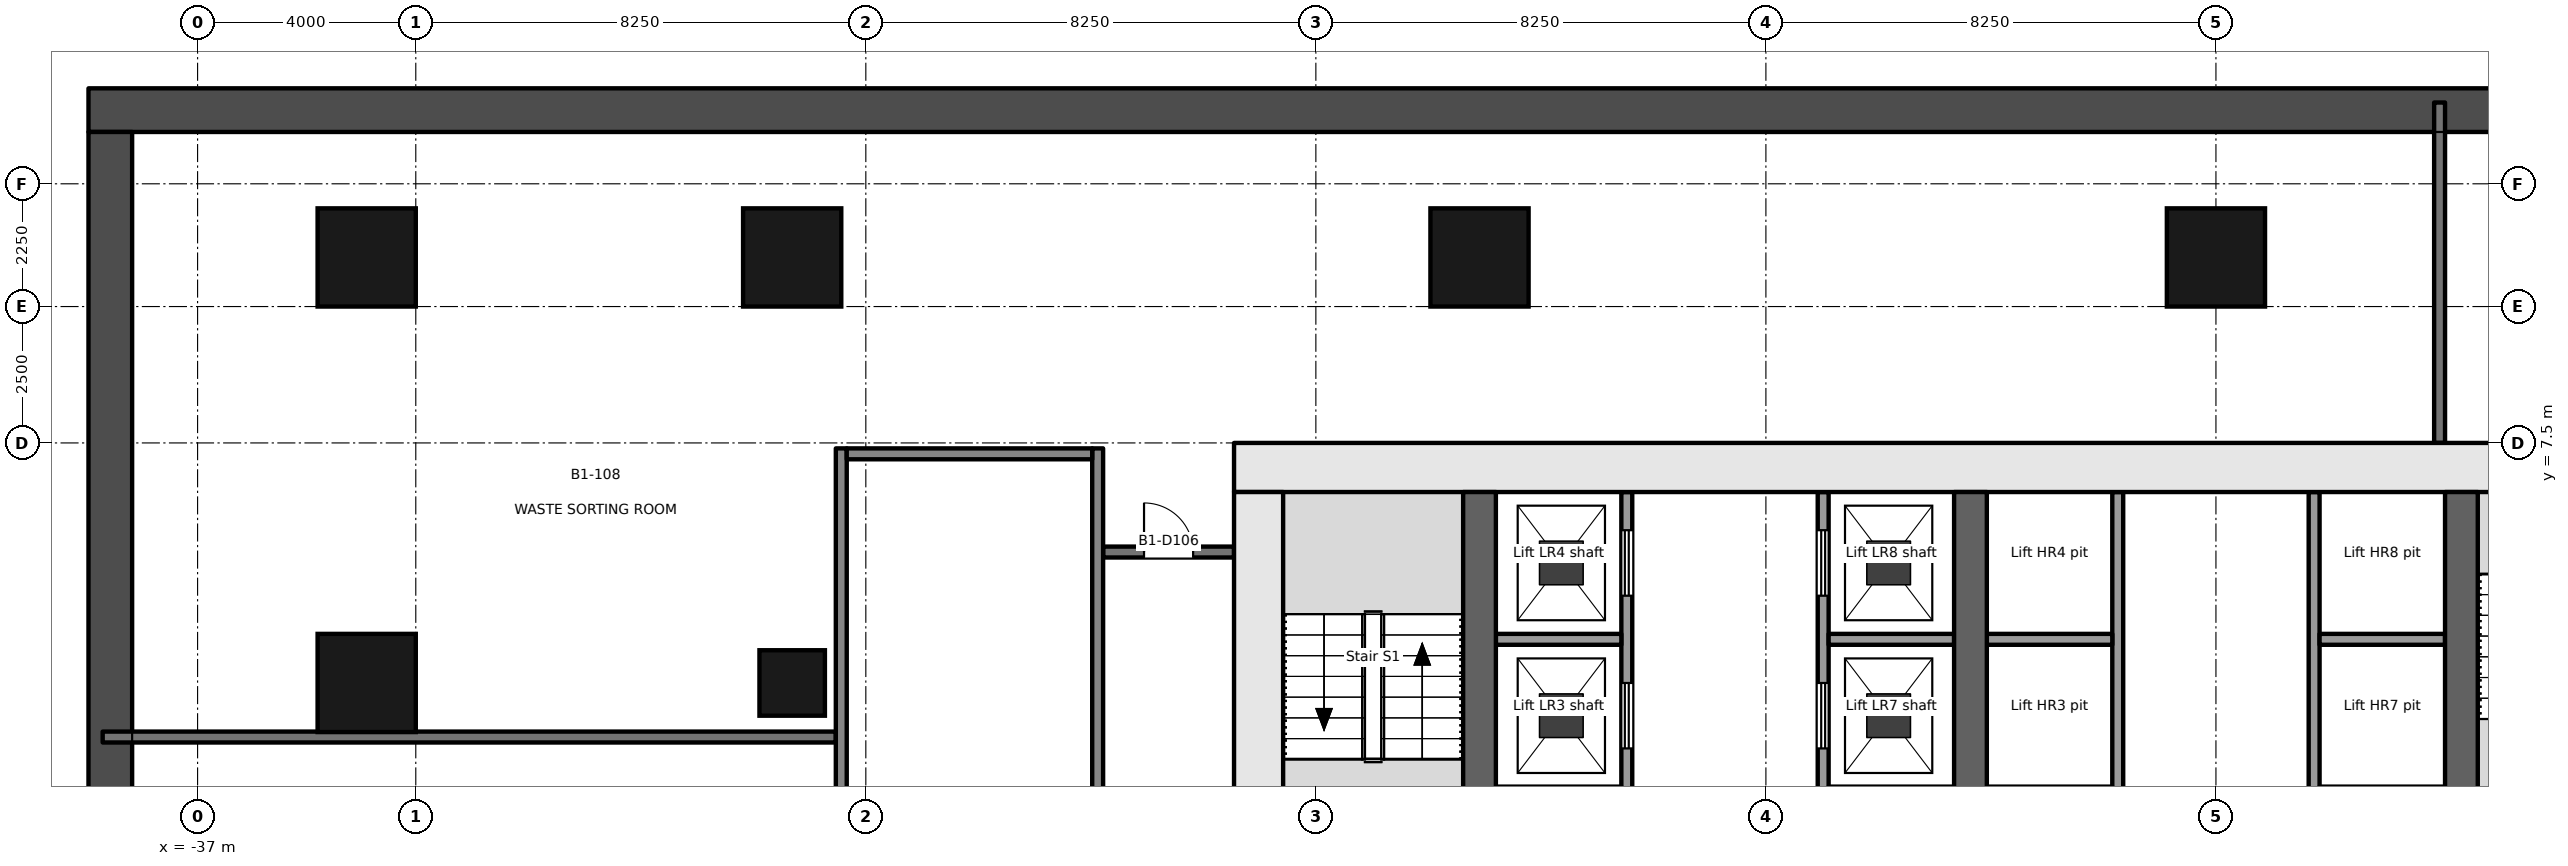
"""IFC4 building model, lengths in metres.
Left out: names, types, materials, properties, quantities, classifications, styles, units other than length and angle.
Written with IfcOpenShell. Run it as: python <this file> out.ifc"""

import sys

from ifc_helpers import new_model, si_unit, direction, frame, frame_2d, origin, origin_2d, place, context, subcontext, project, spatial, rectangle, extrude, element, fill, save


model = new_model("IFC4")
c1 = context("Model", 3, precision=1e-05, world=origin(), true_north=direction((0.0, 1.0)))
c2 = subcontext(c1, "Body", "Model", "MODEL_VIEW")
j1 = project(units=[si_unit("LENGTHUNIT", "METRE"), si_unit("PLANEANGLEUNIT", "RADIAN")], contexts=[c1])
p1 = place(None, origin())
s1 = spatial("IfcSite", under=j1, at=p1, CompositionType="ELEMENT")
p2 = place(p1, origin())
s2 = spatial("IfcBuilding", under=s1, at=p2, CompositionType="ELEMENT")
p3 = place(p2, frame((0.0, 0.0, -5.5)))
s3 = spatial("IfcBuildingStorey", under=s2, at=p3, CompositionType="ELEMENT", Elevation=-5.5)
p4 = place(p3, frame((-39.0, 13.6, -0.2), z_axis=(0.0, 0.0, 1.0), x_axis=(1.0, 0.0, 0.0)))
e1 = element("IfcWall", 1, at=p4, inside=s3, PredefinedType="SOLIDWALL", context=c2, shape_type="SweptSolid", body=[
    extrude(rectangle(XDim=78.0, YDim=0.8, at=frame_2d((39.0, 0.0))), origin(), (0.0, 0.0, 1.0), 5.5),
])
p5 = place(p3, frame((-38.6, -38.7, -0.2), z_axis=(0.0, 0.0, 1.0), x_axis=(0.0, 1.0, 0.0)))
e2 = element("IfcWall", 2, at=p5, inside=s3, PredefinedType="SOLIDWALL", context=c2, shape_type="SweptSolid", body=[
    extrude(rectangle(XDim=51.9, YDim=0.8, at=frame_2d((25.95, 0.0))), origin(), (0.0, 0.0, 1.0), 5.5),
])
for number, where, z_axis, x_axis in (
    (3, (-33.9, 10.9, -0.2), (0.0, 0.0, 1.0), (1.0, 0.0, 0.0)),
    (4, (-33.9, 3.1, -0.2), (0.0, 0.0, 1.0), (0.0, 1.0, 0.0)),
    (5, (-26.1, 10.9, -0.2), (0.0, 0.0, 1.0), (1.0, 0.0, 0.0)),
    (6, (-13.5, 10.9, -0.2), (0.0, 0.0, 1.0), (1.0, 0.0, 0.0)),
    (7, (0.0, 10.9, -0.2), (0.0, 0.0, 1.0), (1.0, 0.0, 0.0)),
):
    element("IfcColumn", number, at=place(p3, frame(where, z_axis=z_axis, x_axis=x_axis)), inside=s3, PredefinedType="COLUMN", context=c2, shape_type="SweptSolid", body=[
        extrude(rectangle(XDim=1.8, YDim=1.8, at=origin_2d()), origin(), (0.0, 0.0, 1.0), 5.5),
    ])
p6 = place(p3, frame((-26.1, 3.1, -0.2), z_axis=(0.0, 0.0, 1.0), x_axis=(1.0, 0.0, 0.0)))
e8 = element("IfcColumn", 8, at=p6, inside=s3, PredefinedType="COLUMN", context=c2, shape_type="SweptSolid", body=[
    extrude(rectangle(XDim=1.2, YDim=1.2, at=origin_2d()), origin(), (0.0, 0.0, 1.0), 5.5),
])
p7 = place(p3, frame((-18.0, 7.05, -0.2), z_axis=(0.0, 0.0, 1.0), x_axis=(1.0, 0.0, 0.0)))
e9 = element("IfcWall", 9, at=p7, inside=s3, PredefinedType="SHEAR", context=c2, shape_type="SweptSolid", body=[
    extrude(rectangle(XDim=36.0, YDim=0.9, at=frame_2d((18.0, 0.0))), origin(), (0.0, 0.0, 1.0), 5.5),
])
p8 = place(p3, frame((-17.55, -6.6, -0.2), z_axis=(0.0, 0.0, 1.0), x_axis=(0.0, 1.0, 0.0)))
e10 = element("IfcWall", 10, at=p8, inside=s3, PredefinedType="SHEAR", context=c2, shape_type="SweptSolid", body=[
    extrude(rectangle(XDim=13.2, YDim=0.9, at=frame_2d((6.6, 0.0))), origin(), (0.0, 0.0, 1.0), 5.5),
])
p9 = place(p8, frame((4.55, 0.0, 0.2)))
e11 = element("IfcOpeningElement", 11, at=p9, cuts=e10, PredefinedType="OPENING", context=c2, shape_type="SweptSolid", body=[
    extrude(rectangle(XDim=1.2, YDim=2.1, at=frame_2d((0.6, 1.05))), frame((0.0, 0.46, 0.0), z_axis=(0.0, -1.0, 0.0), x_axis=(1.0, 0.0, 0.0)), (0.0, 0.0, 1.0), 0.921),
])
for number, where, z_axis, x_axis in (
    (12, (-13.5, -6.6, -0.2), (0.0, 0.0, 1.0), (0.0, 1.0, 0.0)),
    (13, (-4.5, -6.6, -0.2), (0.0, 0.0, 1.0), (0.0, 1.0, 0.0)),
    (14, (4.5, -6.6, -0.2), (0.0, 0.0, 1.0), (0.0, 1.0, 0.0)),
):
    element("IfcWall", number, at=place(p3, frame(where, z_axis=z_axis, x_axis=x_axis)), inside=s3, PredefinedType="SHEAR", context=c2, shape_type="SweptSolid", body=[
        extrude(rectangle(XDim=13.2, YDim=0.6, at=frame_2d((6.6, 0.0))), origin(), (0.0, 0.0, 1.0), 5.5),
    ])
p10 = place(p3, frame((-10.8, -6.6, 0.0), z_axis=(0.0, 0.0, 1.0), x_axis=(0.0, 1.0, 0.0)))
e15 = element("IfcWall", 15, at=p10, inside=s3, PredefinedType="PARTITIONING", context=c2, shape_type="SweptSolid", body=[
    extrude(rectangle(XDim=13.2, YDim=0.2, at=frame_2d((6.6, 0.0))), origin(), (0.0, 0.0, 1.0), 5.3),
])
p11 = place(p10, frame((0.55, 0.0, 0.0)))
e16 = element("IfcOpeningElement", 16, at=p11, cuts=e15, PredefinedType="OPENING", context=c2, shape_type="SweptSolid", body=[
    extrude(rectangle(XDim=0.9, YDim=2.1, at=frame_2d((0.45, 1.05))), frame((0.0, 0.111, 0.0), z_axis=(0.0, -1.0, 0.0), x_axis=(1.0, 0.0, 0.0)), (0.0, 0.0, 1.0), 0.221),
])
p12 = place(p10, frame((2.9, 0.0, 0.0)))
e17 = element("IfcOpeningElement", 17, at=p12, cuts=e15, PredefinedType="OPENING", context=c2, shape_type="SweptSolid", body=[
    extrude(rectangle(XDim=1.2, YDim=2.1, at=frame_2d((0.6, 1.05))), frame((0.0, 0.111, 0.0), z_axis=(0.0, -1.0, 0.0), x_axis=(1.0, 0.0, 0.0)), (0.0, 0.0, 1.0), 0.221),
])
p13 = place(p10, frame((5.7, 0.0, 0.0)))
e18 = element("IfcOpeningElement", 18, at=p13, cuts=e15, PredefinedType="OPENING", context=c2, shape_type="SweptSolid", body=[
    extrude(rectangle(XDim=1.2, YDim=2.1, at=frame_2d((0.6, 1.05))), frame((0.0, 0.111, 0.0), z_axis=(0.0, -1.0, 0.0), x_axis=(1.0, 0.0, 0.0)), (0.0, 0.0, 1.0), 0.221),
])
p14 = place(p10, frame((8.5, 0.0, 0.0)))
e19 = element("IfcOpeningElement", 19, at=p14, cuts=e15, PredefinedType="OPENING", context=c2, shape_type="SweptSolid", body=[
    extrude(rectangle(XDim=1.2, YDim=2.1, at=frame_2d((0.6, 1.05))), frame((0.0, 0.111, 0.0), z_axis=(0.0, -1.0, 0.0), x_axis=(1.0, 0.0, 0.0)), (0.0, 0.0, 1.0), 0.221),
])
p15 = place(p10, frame((11.3, 0.0, 0.0)))
e20 = element("IfcOpeningElement", 20, at=p15, cuts=e15, PredefinedType="OPENING", context=c2, shape_type="SweptSolid", body=[
    extrude(rectangle(XDim=1.2, YDim=2.1, at=frame_2d((0.6, 1.05))), frame((0.0, 0.111, 0.0), z_axis=(0.0, -1.0, 0.0), x_axis=(1.0, 0.0, 0.0)), (0.0, 0.0, 1.0), 0.221),
])
p16 = place(p3, frame((-7.2, -6.6, 0.0), z_axis=(0.0, 0.0, 1.0), x_axis=(0.0, 1.0, 0.0)))
e21 = element("IfcWall", 21, at=p16, inside=s3, PredefinedType="PARTITIONING", context=c2, shape_type="SweptSolid", body=[
    extrude(rectangle(XDim=13.2, YDim=0.2, at=frame_2d((6.6, 0.0))), origin(), (0.0, 0.0, 1.0), 5.3),
])
p17 = place(p16, frame((0.55, 0.0, 0.0)))
e22 = element("IfcOpeningElement", 22, at=p17, cuts=e21, PredefinedType="OPENING", context=c2, shape_type="SweptSolid", body=[
    extrude(rectangle(XDim=0.9, YDim=2.1, at=frame_2d((0.45, 1.05))), frame((0.0, 0.111, 0.0), z_axis=(0.0, -1.0, 0.0), x_axis=(1.0, 0.0, 0.0)), (0.0, 0.0, 1.0), 0.221),
])
p18 = place(p16, frame((2.9, 0.0, 0.0)))
e23 = element("IfcOpeningElement", 23, at=p18, cuts=e21, PredefinedType="OPENING", context=c2, shape_type="SweptSolid", body=[
    extrude(rectangle(XDim=1.2, YDim=2.1, at=frame_2d((0.6, 1.05))), frame((0.0, 0.111, 0.0), z_axis=(0.0, -1.0, 0.0), x_axis=(1.0, 0.0, 0.0)), (0.0, 0.0, 1.0), 0.221),
])
p19 = place(p16, frame((5.7, 0.0, 0.0)))
e24 = element("IfcOpeningElement", 24, at=p19, cuts=e21, PredefinedType="OPENING", context=c2, shape_type="SweptSolid", body=[
    extrude(rectangle(XDim=1.2, YDim=2.1, at=frame_2d((0.6, 1.05))), frame((0.0, 0.111, 0.0), z_axis=(0.0, -1.0, 0.0), x_axis=(1.0, 0.0, 0.0)), (0.0, 0.0, 1.0), 0.221),
])
p20 = place(p16, frame((8.5, 0.0, 0.0)))
e25 = element("IfcOpeningElement", 25, at=p20, cuts=e21, PredefinedType="OPENING", context=c2, shape_type="SweptSolid", body=[
    extrude(rectangle(XDim=1.2, YDim=2.1, at=frame_2d((0.6, 1.05))), frame((0.0, 0.111, 0.0), z_axis=(0.0, -1.0, 0.0), x_axis=(1.0, 0.0, 0.0)), (0.0, 0.0, 1.0), 0.221),
])
p21 = place(p16, frame((11.3, 0.0, 0.0)))
e26 = element("IfcOpeningElement", 26, at=p21, cuts=e21, PredefinedType="OPENING", context=c2, shape_type="SweptSolid", body=[
    extrude(rectangle(XDim=1.2, YDim=2.1, at=frame_2d((0.6, 1.05))), frame((0.0, 0.111, 0.0), z_axis=(0.0, -1.0, 0.0), x_axis=(1.0, 0.0, 0.0)), (0.0, 0.0, 1.0), 0.221),
])
for number, where, z_axis, x_axis in (
    (27, (-13.2, 3.9, 0.0), (0.0, 0.0, 1.0), (1.0, 0.0, 0.0)),
    (28, (-7.1, 3.9, 0.0), (0.0, 0.0, 1.0), (1.0, 0.0, 0.0)),
):
    element("IfcWall", number, at=place(p3, frame(where, z_axis=z_axis, x_axis=x_axis)), inside=s3, PredefinedType="PARTITIONING", context=c2, shape_type="SweptSolid", body=[
        extrude(rectangle(XDim=2.3, YDim=0.2, at=frame_2d((1.15, 0.0))), origin(), (0.0, 0.0, 1.0), 5.3),
    ])
p22 = place(p3, frame((-1.8, -6.6, 0.0), z_axis=(0.0, 0.0, 1.0), x_axis=(0.0, 1.0, 0.0)))
e29 = element("IfcWall", 29, at=p22, inside=s3, PredefinedType="PARTITIONING", context=c2, shape_type="SweptSolid", body=[
    extrude(rectangle(XDim=13.2, YDim=0.2, at=frame_2d((6.6, 0.0))), origin(), (0.0, 0.0, 1.0), 5.3),
])
p23 = place(p22, frame((0.55, 0.0, 0.0)))
e30 = element("IfcOpeningElement", 30, at=p23, cuts=e29, PredefinedType="OPENING", context=c2, shape_type="SweptSolid", body=[
    extrude(rectangle(XDim=0.9, YDim=2.1, at=frame_2d((0.45, 1.05))), frame((0.0, 0.111, 0.0), z_axis=(0.0, -1.0, 0.0), x_axis=(1.0, 0.0, 0.0)), (0.0, 0.0, 1.0), 0.221),
])
p24 = place(p3, frame((1.8, -6.6, 0.0), z_axis=(0.0, 0.0, 1.0), x_axis=(0.0, 1.0, 0.0)))
e31 = element("IfcWall", 31, at=p24, inside=s3, PredefinedType="PARTITIONING", context=c2, shape_type="SweptSolid", body=[
    extrude(rectangle(XDim=13.2, YDim=0.2, at=frame_2d((6.6, 0.0))), origin(), (0.0, 0.0, 1.0), 5.3),
])
p25 = place(p24, frame((0.55, 0.0, 0.0)))
e32 = element("IfcOpeningElement", 32, at=p25, cuts=e31, PredefinedType="OPENING", context=c2, shape_type="SweptSolid", body=[
    extrude(rectangle(XDim=0.9, YDim=2.1, at=frame_2d((0.45, 1.05))), frame((0.0, 0.111, 0.0), z_axis=(0.0, -1.0, 0.0), x_axis=(1.0, 0.0, 0.0)), (0.0, 0.0, 1.0), 0.221),
])
for number, where, z_axis, x_axis in (
    (33, (-4.2, 3.9, 0.0), (0.0, 0.0, 1.0), (1.0, 0.0, 0.0)),
    (34, (1.9, 3.9, 0.0), (0.0, 0.0, 1.0), (1.0, 0.0, 0.0)),
):
    element("IfcWall", number, at=place(p3, frame(where, z_axis=z_axis, x_axis=x_axis)), inside=s3, PredefinedType="PARTITIONING", context=c2, shape_type="SweptSolid", body=[
        extrude(rectangle(XDim=2.3, YDim=0.2, at=frame_2d((1.15, 0.0))), origin(), (0.0, 0.0, 1.0), 5.3),
    ])
for number, where, z_axis, x_axis in (
    (35, (-20.5, 7.4, -0.2), (0.0, 0.0, 1.0), (0.0, -1.0, 0.0)),
    (36, (-25.2, 0.0, -0.2), (0.0, 0.0, 1.0), (0.0, 1.0, 0.0)),
):
    element("IfcWall", number, at=place(p3, frame(where, z_axis=z_axis, x_axis=x_axis)), inside=s3, PredefinedType="SHEAR", context=c2, shape_type="SweptSolid", body=[
        extrude(rectangle(XDim=7.4, YDim=0.2, at=frame_2d((3.7, 0.0))), origin(), (0.0, 0.0, 1.0), 5.5),
    ])
p26 = place(p3, frame((-25.1, 7.3, -0.2), z_axis=(0.0, 0.0, 1.0), x_axis=(1.0, 0.0, 0.0)))
e37 = element("IfcWall", 37, at=p26, inside=s3, PredefinedType="SHEAR", context=c2, shape_type="SweptSolid", body=[
    extrude(rectangle(XDim=4.5, YDim=0.2, at=frame_2d((2.25, 0.0))), origin(), (0.0, 0.0, 1.0), 5.5),
])
p27 = place(p3, frame((-20.4, 5.5, 0.0), z_axis=(0.0, 0.0, 1.0), x_axis=(1.0, 0.0, 0.0)))
e38 = element("IfcWall", 38, at=p27, inside=s3, PredefinedType="PARTITIONING", context=c2, shape_type="SweptSolid", body=[
    extrude(rectangle(XDim=2.4, YDim=0.2, at=frame_2d((1.2, 0.0))), origin(), (0.0, 0.0, 1.0), 5.3),
])
p28 = place(p27, frame((0.75, 0.0, 0.0)))
e39 = element("IfcOpeningElement", 39, at=p28, cuts=e38, PredefinedType="OPENING", context=c2, shape_type="SweptSolid", body=[
    extrude(rectangle(XDim=0.9, YDim=2.1, at=frame_2d((0.45, 1.05))), frame((0.0, 0.111, 0.0), z_axis=(0.0, -1.0, 0.0), x_axis=(1.0, 0.0, 0.0)), (0.0, 0.0, 1.0), 0.221),
])
p29 = place(p3, frame((-38.74, 2.109, 0.0), z_axis=(0.0, 0.0, 1.0), x_axis=(1.0, 0.0, 0.0)))
e40 = element("IfcWall", 40, at=p29, inside=s3, PredefinedType="PARTITIONING", context=c2, shape_type="SweptSolid", body=[
    extrude(rectangle(XDim=13.44, YDim=0.2, at=frame_2d((6.72, 0.0))), origin(), (0.0, 0.0, 1.0), 4.1),
])
p30 = place(p3, frame((4.1, 13.74, 0.0), z_axis=(0.0, 0.0, 1.0), x_axis=(0.0, -1.0, 0.0)))
e41 = element("IfcWall", 41, at=p30, inside=s3, PredefinedType="PARTITIONING", context=c2, shape_type="SweptSolid", body=[
    extrude(rectangle(XDim=6.24, YDim=0.2, at=frame_2d((3.12, 0.0))), origin(), (0.0, 0.0, 1.0), 4.3),
])
p31 = place(p14, origin())
e42 = element("IfcDoor", 42, at=p31, inside=s3, OperationType="DOUBLE_DOOR_SLIDING", PredefinedType="DOOR", context=c2, shape_type="SweptSolid", body=[
    extrude(rectangle(XDim=1.2, YDim=2.1, at=frame_2d((0.6, 1.05))), frame((0.0, 0.025, 0.0), z_axis=(0.0, -1.0, 0.0), x_axis=(1.0, 0.0, 0.0)), (0.0, 0.0, 1.0), 0.05),
])
fill(e19, e42)
p32 = place(p15, origin())
e43 = element("IfcDoor", 43, at=p32, inside=s3, OperationType="DOUBLE_DOOR_SLIDING", PredefinedType="DOOR", context=c2, shape_type="SweptSolid", body=[
    extrude(rectangle(XDim=1.2, YDim=2.1, at=frame_2d((0.6, 1.05))), frame((0.0, 0.025, 0.0), z_axis=(0.0, -1.0, 0.0), x_axis=(1.0, 0.0, 0.0)), (0.0, 0.0, 1.0), 0.05),
])
fill(e20, e43)
p33 = place(p20, origin())
e44 = element("IfcDoor", 44, at=p33, inside=s3, OperationType="DOUBLE_DOOR_SLIDING", PredefinedType="DOOR", context=c2, shape_type="SweptSolid", body=[
    extrude(rectangle(XDim=1.2, YDim=2.1, at=frame_2d((0.6, 1.05))), frame((0.0, 0.025, 0.0), z_axis=(0.0, -1.0, 0.0), x_axis=(1.0, 0.0, 0.0)), (0.0, 0.0, 1.0), 0.05),
])
fill(e25, e44)
p34 = place(p21, origin())
e45 = element("IfcDoor", 45, at=p34, inside=s3, OperationType="DOUBLE_DOOR_SLIDING", PredefinedType="DOOR", context=c2, shape_type="SweptSolid", body=[
    extrude(rectangle(XDim=1.2, YDim=2.1, at=frame_2d((0.6, 1.05))), frame((0.0, 0.025, 0.0), z_axis=(0.0, -1.0, 0.0), x_axis=(1.0, 0.0, 0.0)), (0.0, 0.0, 1.0), 0.05),
])
fill(e26, e45)
p35 = place(p28, origin())
e46 = element("IfcDoor", 46, at=p35, inside=s3, OperationType="SINGLE_SWING_LEFT", PredefinedType="DOOR", context=c2, shape_type="SweptSolid", body=[
    extrude(rectangle(XDim=0.9, YDim=2.1, at=frame_2d((0.45, 1.05))), frame((0.0, 0.025, 0.0), z_axis=(0.0, -1.0, 0.0), x_axis=(1.0, 0.0, 0.0)), (0.0, 0.0, 1.0), 0.05),
])
fill(e39, e46)
save(model, sys.argv[1])
